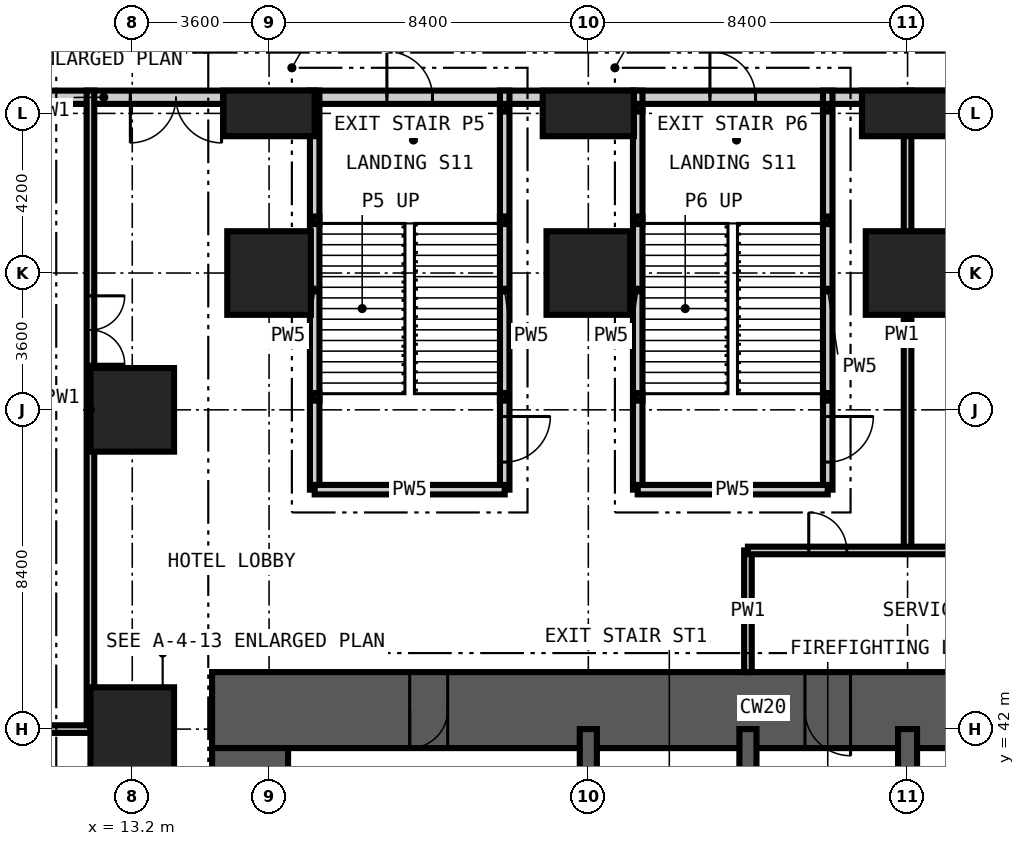
"""IFC4 building model, lengths in metres.
Left out: names, types, materials, properties, quantities, classifications, styles, units other than length and angle.
Written with IfcOpenShell. Run it as: python <this file> out.ifc"""

import sys

from ifc_helpers import new_model, si_unit, direction, frame, frame_2d, origin, origin_2d, place, context, subcontext, project, spatial, rectangle, hollow_rectangle, extrude, element, fill, save


model = new_model("IFC4")
c1 = context("Model", 3, precision=1e-05, world=origin(), true_north=direction((0.0, 1.0)))
c2 = subcontext(c1, "Body", "Model", "MODEL_VIEW")
j1 = project(units=[si_unit("LENGTHUNIT", "METRE"), si_unit("PLANEANGLEUNIT", "RADIAN")], contexts=[c1])
p1 = place(None, origin())
s1 = spatial("IfcSite", under=j1, at=p1, CompositionType="ELEMENT")
p2 = place(p1, origin())
s2 = spatial("IfcBuilding", under=s1, at=p2, CompositionType="ELEMENT")
p3 = place(p2, origin())
s3 = spatial("IfcBuildingStorey", under=s2, at=p3, CompositionType="ELEMENT", Elevation=0.0)
for number, where, z_axis, x_axis in (
    (1, (13.2, 42.0, -0.3), (0.0, 0.0, 1.0), (1.0, 0.0, 0.0)),
    (2, (13.2, 50.4, -0.3), (0.0, 0.0, 1.0), (1.0, 0.0, 0.0)),
    (3, (16.8, 54.0, -0.3), (0.0, 0.0, 1.0), (1.0, 0.0, 0.0)),
):
    element("IfcColumn", number, at=place(p3, frame(where, z_axis=z_axis, x_axis=x_axis)), inside=s3, PredefinedType="COLUMN", context=c2, shape_type="SweptSolid", body=[
        extrude(rectangle(XDim=2.2, YDim=2.2, at=origin_2d()), origin(), (0.0, 0.0, 1.0), 6.0),
    ])
p4 = place(p3, frame((16.8, 58.2, -0.3), z_axis=(0.0, 0.0, 1.0), x_axis=(1.0, 0.0, 0.0)))
e4 = element("IfcColumn", 4, at=p4, inside=s3, PredefinedType="COLUMN", context=c2, shape_type="SweptSolid", body=[
    extrude(rectangle(XDim=2.4, YDim=1.2, at=origin_2d()), origin(), (0.0, 0.0, 1.0), 6.0),
])
p5 = place(p3, frame((25.2, 54.0, -0.3), z_axis=(0.0, 0.0, 1.0), x_axis=(1.0, 0.0, 0.0)))
e5 = element("IfcColumn", 5, at=p5, inside=s3, PredefinedType="COLUMN", context=c2, shape_type="SweptSolid", body=[
    extrude(rectangle(XDim=2.2, YDim=2.2, at=origin_2d()), origin(), (0.0, 0.0, 1.0), 6.0),
])
p6 = place(p3, frame((25.2, 58.2, -0.3), z_axis=(0.0, 0.0, 1.0), x_axis=(1.0, 0.0, 0.0)))
e6 = element("IfcColumn", 6, at=p6, inside=s3, PredefinedType="COLUMN", context=c2, shape_type="SweptSolid", body=[
    extrude(rectangle(XDim=2.4, YDim=1.2, at=origin_2d()), origin(), (0.0, 0.0, 1.0), 6.0),
])
p7 = place(p3, frame((33.6, 54.0, -0.3), z_axis=(0.0, 0.0, 1.0), x_axis=(1.0, 0.0, 0.0)))
e7 = element("IfcColumn", 7, at=p7, inside=s3, PredefinedType="COLUMN", context=c2, shape_type="SweptSolid", body=[
    extrude(rectangle(XDim=2.2, YDim=2.2, at=origin_2d()), origin(), (0.0, 0.0, 1.0), 6.0),
])
p8 = place(p3, frame((33.6, 58.2, -0.3), z_axis=(0.0, 0.0, 1.0), x_axis=(1.0, 0.0, 0.0)))
e8 = element("IfcColumn", 8, at=p8, inside=s3, PredefinedType="COLUMN", context=c2, shape_type="SweptSolid", body=[
    extrude(rectangle(XDim=2.4, YDim=1.2, at=origin_2d()), origin(), (0.0, 0.0, 1.0), 6.0),
])
p9 = place(p3, frame((43.5, 42.5, -0.3), z_axis=(0.0, 0.0, 1.0), x_axis=(-1.0, 0.0, 0.0)))
e9 = element("IfcWall", 9, at=p9, inside=s3, PredefinedType="SHEAR", context=c2, shape_type="SweptSolid", body=[
    extrude(rectangle(XDim=28.2, YDim=2.0, at=frame_2d((14.1, 0.0))), origin(), (0.0, 0.0, 1.0), 6.0),
])
p10 = place(p9, frame((22.0, 0.0, 0.3)))
e10 = element("IfcOpeningElement", 10, at=p10, cuts=e9, PredefinedType="OPENING", context=c2, shape_type="SweptSolid", body=[
    extrude(rectangle(XDim=1.0, YDim=2.1, at=frame_2d((0.5, 1.05))), frame((0.0, 1.01, 0.0), z_axis=(0.0, -1.0, 0.0), x_axis=(1.0, 0.0, 0.0)), (0.0, 0.0, 1.0), 2.02),
])
p11 = place(p9, frame((11.4, 0.0, 0.3)))
e11 = element("IfcOpeningElement", 11, at=p11, cuts=e9, PredefinedType="OPENING", context=c2, shape_type="SweptSolid", body=[
    extrude(rectangle(XDim=1.2, YDim=2.2, at=frame_2d((0.6, 1.1))), frame((0.0, 1.01, 0.0), z_axis=(0.0, -1.0, 0.0), x_axis=(1.0, 0.0, 0.0)), (0.0, 0.0, 1.0), 2.02),
])
p12 = place(p3, frame((16.3, 41.5, -0.3), z_axis=(0.0, 0.0, 1.0), x_axis=(0.0, -1.0, 0.0)))
e12 = element("IfcWall", 12, at=p12, inside=s3, PredefinedType="SHEAR", context=c2, shape_type="SweptSolid", body=[
    extrude(rectangle(XDim=24.2, YDim=2.0, at=frame_2d((12.1, 0.0))), origin(), (0.0, 0.0, 1.0), 6.0),
])
p13 = place(p12, frame((11.2, 0.0, 0.3)))
e13 = element("IfcOpeningElement", 13, at=p13, cuts=e12, PredefinedType="OPENING", context=c2, shape_type="SweptSolid", body=[
    extrude(rectangle(XDim=1.8, YDim=2.2, at=frame_2d((0.9, 1.1))), frame((0.0, 1.01, 0.0), z_axis=(0.0, -1.0, 0.0), x_axis=(1.0, 0.0, 0.0)), (0.0, 0.0, 1.0), 2.02),
])
p14 = place(p12, frame((19.6, 0.0, 0.3)))
e14 = element("IfcOpeningElement", 14, at=p14, cuts=e12, PredefinedType="OPENING", context=c2, shape_type="SweptSolid", body=[
    extrude(rectangle(XDim=1.8, YDim=2.2, at=frame_2d((0.9, 1.1))), frame((0.0, 1.01, 0.0), z_axis=(0.0, -1.0, 0.0), x_axis=(1.0, 0.0, 0.0)), (0.0, 0.0, 1.0), 2.02),
])
p15 = place(p12, frame((5.3, 0.0, 0.3)))
e15 = element("IfcOpeningElement", 15, at=p15, cuts=e12, PredefinedType="OPENING", context=c2, shape_type="SweptSolid", body=[
    extrude(rectangle(XDim=1.0, YDim=2.1, at=frame_2d((0.5, 1.05))), frame((0.0, 1.01, 0.0), z_axis=(0.0, -1.0, 0.0), x_axis=(1.0, 0.0, 0.0)), (0.0, 0.0, 1.0), 2.02),
])
p16 = place(p3, frame((58.8, 58.625, 0.0), z_axis=(0.0, 0.0, 1.0), x_axis=(-1.0, 0.0, 0.0)))
e16 = element("IfcWall", 16, at=p16, inside=s3, PredefinedType="SOLIDWALL", context=c2, shape_type="SweptSolid", body=[
    extrude(rectangle(XDim=92.4, YDim=0.35, at=frame_2d((46.2, 0.0))), origin(), (0.0, 0.0, 1.0), 5.7),
])
p17 = place(p16, frame((85.2, 0.0, 0.0)))
e17 = element("IfcOpeningElement", 17, at=p17, cuts=e16, PredefinedType="OPENING", context=c2, shape_type="SweptSolid", body=[
    extrude(rectangle(XDim=1.8, YDim=2.7, at=frame_2d((0.9, 1.35))), frame((0.0, 0.185, 0.0), z_axis=(0.0, -1.0, 0.0), x_axis=(1.0, 0.0, 0.0)), (0.0, 0.0, 1.0), 0.37),
])
p18 = place(p16, frame((87.2, 0.0, 0.9)))
e18 = element("IfcOpeningElement", 18, at=p18, cuts=e16, PredefinedType="OPENING", context=c2, shape_type="SweptSolid", body=[
    extrude(rectangle(XDim=2.4, YDim=2.4, at=frame_2d((1.2, 1.2))), frame((0.0, 0.185, 0.0), z_axis=(0.0, -1.0, 0.0), x_axis=(1.0, 0.0, 0.0)), (0.0, 0.0, 1.0), 0.37),
])
p19 = place(p16, frame((80.7, 0.0, 0.9)))
e19 = element("IfcOpeningElement", 19, at=p19, cuts=e16, PredefinedType="OPENING", context=c2, shape_type="SweptSolid", body=[
    extrude(rectangle(XDim=2.4, YDim=2.4, at=frame_2d((1.2, 1.2))), frame((0.0, 0.185, 0.0), z_axis=(0.0, -1.0, 0.0), x_axis=(1.0, 0.0, 0.0)), (0.0, 0.0, 1.0), 0.37),
])
p20 = place(p16, frame((76.2, 0.0, 0.9)))
e20 = element("IfcOpeningElement", 20, at=p20, cuts=e16, PredefinedType="OPENING", context=c2, shape_type="SweptSolid", body=[
    extrude(rectangle(XDim=2.4, YDim=2.4, at=frame_2d((1.2, 1.2))), frame((0.0, 0.185, 0.0), z_axis=(0.0, -1.0, 0.0), x_axis=(1.0, 0.0, 0.0)), (0.0, 0.0, 1.0), 0.37),
])
p21 = place(p16, frame((71.9, 0.0, 0.0)))
e21 = element("IfcOpeningElement", 21, at=p21, cuts=e16, PredefinedType="OPENING", context=c2, shape_type="SweptSolid", body=[
    extrude(rectangle(XDim=1.2, YDim=2.4, at=frame_2d((0.6, 1.2))), frame((0.0, 0.185, 0.0), z_axis=(0.0, -1.0, 0.0), x_axis=(1.0, 0.0, 0.0)), (0.0, 0.0, 1.0), 0.37),
])
p22 = place(p16, frame((63.5, 0.0, 0.0)))
e22 = element("IfcOpeningElement", 22, at=p22, cuts=e16, PredefinedType="OPENING", context=c2, shape_type="SweptSolid", body=[
    extrude(rectangle(XDim=1.2, YDim=2.4, at=frame_2d((0.6, 1.2))), frame((0.0, 0.185, 0.0), z_axis=(0.0, -1.0, 0.0), x_axis=(1.0, 0.0, 0.0)), (0.0, 0.0, 1.0), 0.37),
])
p23 = place(p16, frame((59.0, 0.0, 0.0)))
e23 = element("IfcOpeningElement", 23, at=p23, cuts=e16, PredefinedType="OPENING", context=c2, shape_type="SweptSolid", body=[
    extrude(rectangle(XDim=2.4, YDim=3.0, at=frame_2d((1.2, 1.5))), frame((0.0, 0.185, 0.0), z_axis=(0.0, -1.0, 0.0), x_axis=(1.0, 0.0, 0.0)), (0.0, 0.0, 1.0), 0.37),
])
p24 = place(p16, frame((53.4, 0.0, 0.9)))
e24 = element("IfcOpeningElement", 24, at=p24, cuts=e16, PredefinedType="OPENING", context=c2, shape_type="SweptSolid", body=[
    extrude(rectangle(XDim=2.4, YDim=2.4, at=frame_2d((1.2, 1.2))), frame((0.0, 0.185, 0.0), z_axis=(0.0, -1.0, 0.0), x_axis=(1.0, 0.0, 0.0)), (0.0, 0.0, 1.0), 0.37),
])
p25 = place(p16, frame((43.25, 0.0, 0.0)))
e25 = element("IfcOpeningElement", 25, at=p25, cuts=e16, PredefinedType="OPENING", context=c2, shape_type="SweptSolid", body=[
    extrude(rectangle(XDim=2.4, YDim=3.0, at=frame_2d((1.2, 1.5))), frame((0.0, 0.185, 0.0), z_axis=(0.0, -1.0, 0.0), x_axis=(1.0, 0.0, 0.0)), (0.0, 0.0, 1.0), 0.37),
])
p26 = place(p16, frame((37.7, 0.0, 0.0)))
e26 = element("IfcOpeningElement", 26, at=p26, cuts=e16, PredefinedType="OPENING", context=c2, shape_type="SweptSolid", body=[
    extrude(rectangle(XDim=1.2, YDim=2.4, at=frame_2d((0.6, 1.2))), frame((0.0, 0.185, 0.0), z_axis=(0.0, -1.0, 0.0), x_axis=(1.0, 0.0, 0.0)), (0.0, 0.0, 1.0), 0.37),
])
p27 = place(p16, frame((29.2, 0.0, 0.0)))
e27 = element("IfcOpeningElement", 27, at=p27, cuts=e16, PredefinedType="OPENING", context=c2, shape_type="SweptSolid", body=[
    extrude(rectangle(XDim=1.2, YDim=2.4, at=frame_2d((0.6, 1.2))), frame((0.0, 0.185, 0.0), z_axis=(0.0, -1.0, 0.0), x_axis=(1.0, 0.0, 0.0)), (0.0, 0.0, 1.0), 0.37),
])
p28 = place(p16, frame((3.5, 0.0, 0.0)))
e28 = element("IfcOpeningElement", 28, at=p28, cuts=e16, PredefinedType="OPENING", context=c2, shape_type="SweptSolid", body=[
    extrude(rectangle(XDim=3.6, YDim=4.5, at=frame_2d((1.8, 2.25))), frame((0.0, 0.185, 0.0), z_axis=(0.0, -1.0, 0.0), x_axis=(1.0, 0.0, 0.0)), (0.0, 0.0, 1.0), 0.37),
])
p29 = place(p16, frame((11.4, 0.0, 0.9)))
e29 = element("IfcOpeningElement", 29, at=p29, cuts=e16, PredefinedType="OPENING", context=c2, shape_type="SweptSolid", body=[
    extrude(rectangle(XDim=2.4, YDim=2.4, at=frame_2d((1.2, 1.2))), frame((0.0, 0.185, 0.0), z_axis=(0.0, -1.0, 0.0), x_axis=(1.0, 0.0, 0.0)), (0.0, 0.0, 1.0), 0.37),
])
p30 = place(p3, frame((25.2, 16.8, -0.3), z_axis=(0.0, 0.0, 1.0), x_axis=(0.0, 1.0, 0.0)))
e30 = element("IfcWall", 30, at=p30, inside=s3, PredefinedType="SHEAR", context=c2, shape_type="SweptSolid", body=[
    extrude(rectangle(XDim=25.2, YDim=0.45, at=frame_2d((12.6, 0.0))), origin(), (0.0, 0.0, 1.0), 6.0),
])
p31 = place(p3, frame((29.4, 33.6, -0.3), z_axis=(0.0, 0.0, 1.0), x_axis=(0.0, 1.0, 0.0)))
e31 = element("IfcWall", 31, at=p31, inside=s3, PredefinedType="SHEAR", context=c2, shape_type="SweptSolid", body=[
    extrude(rectangle(XDim=8.4, YDim=0.45, at=frame_2d((4.2, 0.0))), origin(), (0.0, 0.0, 1.0), 6.0),
])
p32 = place(p31, frame((0.525, 0.0, 0.3)))
e32 = element("IfcOpeningElement", 32, at=p32, cuts=e31, PredefinedType="OPENING", context=c2, shape_type="SweptSolid", body=[
    extrude(rectangle(XDim=1.2, YDim=2.2, at=frame_2d((0.6, 1.1))), frame((0.0, 0.235, 0.0), z_axis=(0.0, -1.0, 0.0), x_axis=(1.0, 0.0, 0.0)), (0.0, 0.0, 1.0), 0.47),
])
p33 = place(p3, frame((33.6, 16.8, -0.3), z_axis=(0.0, 0.0, 1.0), x_axis=(0.0, 1.0, 0.0)))
e33 = element("IfcWall", 33, at=p33, inside=s3, PredefinedType="SHEAR", context=c2, shape_type="SweptSolid", body=[
    extrude(rectangle(XDim=25.2, YDim=0.5, at=frame_2d((12.6, 0.0))), origin(), (0.0, 0.0, 1.0), 6.0),
])
p34 = place(p33, frame((22.5, 0.0, 0.3)))
e34 = element("IfcOpeningElement", 34, at=p34, cuts=e33, PredefinedType="OPENING", context=c2, shape_type="SweptSolid", body=[
    extrude(rectangle(XDim=1.2, YDim=2.2, at=frame_2d((0.6, 1.1))), frame((0.0, 0.26, 0.0), z_axis=(0.0, -1.0, 0.0), x_axis=(1.0, 0.0, 0.0)), (0.0, 0.0, 1.0), 0.52),
])
p35 = place(p33, frame((18.3, 0.0, 0.3)))
e35 = element("IfcOpeningElement", 35, at=p35, cuts=e33, PredefinedType="OPENING", context=c2, shape_type="SweptSolid", body=[
    extrude(rectangle(XDim=1.2, YDim=2.2, at=frame_2d((0.6, 1.1))), frame((0.0, 0.26, 0.0), z_axis=(0.0, -1.0, 0.0), x_axis=(1.0, 0.0, 0.0)), (0.0, 0.0, 1.0), 0.52),
])
p36 = place(p3, frame((29.4, 43.5, 0.0), z_axis=(0.0, 0.0, 1.0), x_axis=(0.0, 1.0, 0.0)))
e36 = element("IfcWall", 36, at=p36, inside=s3, PredefinedType="PARTITIONING", context=c2, shape_type="SweptSolid", body=[
    extrude(rectangle(XDim=3.2, YDim=0.2, at=frame_2d((1.6, 0.0))), origin(), (0.0, 0.0, 1.0), 5.7),
])
p37 = place(p3, frame((33.6, 46.7, 0.0), z_axis=(0.0, 0.0, 1.0), x_axis=(0.0, 1.0, 0.0)))
e37 = element("IfcWall", 37, at=p37, inside=s3, PredefinedType="PARTITIONING", context=c2, shape_type="SweptSolid", body=[
    extrude(rectangle(XDim=12.1, YDim=0.2, at=frame_2d((6.05, 0.0))), origin(), (0.0, 0.0, 1.0), 5.7),
])
p38 = place(p3, frame((29.4, 46.7, 0.0), z_axis=(0.0, 0.0, 1.0), x_axis=(1.0, 0.0, 0.0)))
e38 = element("IfcWall", 38, at=p38, inside=s3, PredefinedType="PARTITIONING", context=c2, shape_type="SweptSolid", body=[
    extrude(rectangle(XDim=12.6, YDim=0.2, at=frame_2d((6.3, 0.0))), origin(), (0.0, 0.0, 1.0), 5.7),
])
p39 = place(p38, frame((1.6, 0.0, 0.0)))
e39 = element("IfcOpeningElement", 39, at=p39, cuts=e38, PredefinedType="OPENING", context=c2, shape_type="SweptSolid", body=[
    extrude(rectangle(XDim=1.0, YDim=2.1, at=frame_2d((0.5, 1.05))), frame((0.0, 0.11, 0.0), z_axis=(0.0, -1.0, 0.0), x_axis=(1.0, 0.0, 0.0)), (0.0, 0.0, 1.0), 0.22),
])
p40 = place(p3, frame((12.1, 58.8, 0.0), z_axis=(0.0, 0.0, 1.0), x_axis=(0.0, -1.0, 0.0)))
e40 = element("IfcWall", 40, at=p40, inside=s3, PredefinedType="PARTITIONING", context=c2, shape_type="SweptSolid", body=[
    extrude(rectangle(XDim=16.8, YDim=0.2, at=frame_2d((8.4, 0.0))), origin(), (0.0, 0.0, 1.0), 5.7),
])
p41 = place(p40, frame((5.4, 0.0, 0.0)))
e41 = element("IfcOpeningElement", 41, at=p41, cuts=e40, PredefinedType="OPENING", context=c2, shape_type="SweptSolid", body=[
    extrude(rectangle(XDim=1.8, YDim=2.4, at=frame_2d((0.9, 1.2))), frame((0.0, 0.11, 0.0), z_axis=(0.0, -1.0, 0.0), x_axis=(1.0, 0.0, 0.0)), (0.0, 0.0, 1.0), 0.22),
])
p42 = place(p3, frame((12.1, 42.0, 0.0), z_axis=(0.0, 0.0, 1.0), x_axis=(-1.0, 0.0, 0.0)))
e42 = element("IfcWall", 42, at=p42, inside=s3, PredefinedType="PARTITIONING", context=c2, shape_type="SweptSolid", body=[
    extrude(rectangle(XDim=4.2, YDim=0.2, at=frame_2d((2.1, 0.0))), origin(), (0.0, 0.0, 1.0), 5.7),
])
p43 = place(p3, frame((18.0, 48.3, 0.0), z_axis=(0.0, 0.0, 1.0), x_axis=(0.0, 1.0, 0.0)))
e43 = element("IfcWall", 43, at=p43, inside=s3, PredefinedType="PARTITIONING", context=c2, shape_type="SweptSolid", body=[
    extrude(rectangle(XDim=10.5, YDim=0.25, at=frame_2d((5.25, 0.0))), origin(), (0.0, 0.0, 1.0), 5.7),
])
p44 = place(p3, frame((23.0, 48.3, 0.0), z_axis=(0.0, 0.0, 1.0), x_axis=(0.0, 1.0, 0.0)))
e44 = element("IfcWall", 44, at=p44, inside=s3, PredefinedType="PARTITIONING", context=c2, shape_type="SweptSolid", body=[
    extrude(rectangle(XDim=10.5, YDim=0.25, at=frame_2d((5.25, 0.0))), origin(), (0.0, 0.0, 1.0), 5.7),
])
p45 = place(p44, frame((0.725, 0.0, 0.0)))
e45 = element("IfcOpeningElement", 45, at=p45, cuts=e44, PredefinedType="OPENING", context=c2, shape_type="SweptSolid", body=[
    extrude(rectangle(XDim=1.2, YDim=2.2, at=frame_2d((0.6, 1.1))), frame((0.0, 0.135, 0.0), z_axis=(0.0, -1.0, 0.0), x_axis=(1.0, 0.0, 0.0)), (0.0, 0.0, 1.0), 0.27),
])
p46 = place(p3, frame((26.5, 48.3, 0.0), z_axis=(0.0, 0.0, 1.0), x_axis=(0.0, 1.0, 0.0)))
e46 = element("IfcWall", 46, at=p46, inside=s3, PredefinedType="PARTITIONING", context=c2, shape_type="SweptSolid", body=[
    extrude(rectangle(XDim=10.5, YDim=0.25, at=frame_2d((5.25, 0.0))), origin(), (0.0, 0.0, 1.0), 5.7),
])
p47 = place(p3, frame((31.5, 48.3, 0.0), z_axis=(0.0, 0.0, 1.0), x_axis=(0.0, 1.0, 0.0)))
e47 = element("IfcWall", 47, at=p47, inside=s3, PredefinedType="PARTITIONING", context=c2, shape_type="SweptSolid", body=[
    extrude(rectangle(XDim=10.5, YDim=0.25, at=frame_2d((5.25, 0.0))), origin(), (0.0, 0.0, 1.0), 5.7),
])
p48 = place(p47, frame((0.725, 0.0, 0.0)))
e48 = element("IfcOpeningElement", 48, at=p48, cuts=e47, PredefinedType="OPENING", context=c2, shape_type="SweptSolid", body=[
    extrude(rectangle(XDim=1.2, YDim=2.2, at=frame_2d((0.6, 1.1))), frame((0.0, 0.135, 0.0), z_axis=(0.0, -1.0, 0.0), x_axis=(1.0, 0.0, 0.0)), (0.0, 0.0, 1.0), 0.27),
])
for number, where, z_axis, x_axis in (
    (49, (18.0, 48.3, 0.0), (0.0, 0.0, 1.0), (1.0, 0.0, 0.0)),
    (50, (26.5, 48.3, 0.0), (0.0, 0.0, 1.0), (1.0, 0.0, 0.0)),
):
    element("IfcWall", number, at=place(p3, frame(where, z_axis=z_axis, x_axis=x_axis)), inside=s3, PredefinedType="PARTITIONING", context=c2, shape_type="SweptSolid", body=[
        extrude(rectangle(XDim=5.0, YDim=0.25, at=frame_2d((2.5, 0.0))), origin(), (0.0, 0.0, 1.0), 5.7),
    ])
for number, where, z_axis, x_axis in (
    (51, (18.025, 50.742, -0.3), (0.0, 0.0, 1.0), (1.0, 0.0, 0.0)),
    (52, (22.975, 50.742, -0.3), (0.0, 0.0, 1.0), (1.0, 0.0, 0.0)),
    (53, (18.025, 55.387, -0.3), (0.0, 0.0, 1.0), (1.0, 0.0, 0.0)),
    (54, (22.975, 55.387, -0.3), (0.0, 0.0, 1.0), (1.0, 0.0, 0.0)),
    (55, (22.975, 58.35, -0.3), (0.0, 0.0, 1.0), (1.0, 0.0, 0.0)),
    (56, (26.525, 50.742, -0.3), (0.0, 0.0, 1.0), (1.0, 0.0, 0.0)),
    (57, (31.475, 50.742, -0.3), (0.0, 0.0, 1.0), (1.0, 0.0, 0.0)),
    (58, (26.525, 55.387, -0.3), (0.0, 0.0, 1.0), (1.0, 0.0, 0.0)),
    (59, (31.475, 55.387, -0.3), (0.0, 0.0, 1.0), (1.0, 0.0, 0.0)),
    (60, (26.525, 58.35, -0.3), (0.0, 0.0, 1.0), (1.0, 0.0, 0.0)),
    (61, (31.475, 58.35, -0.3), (0.0, 0.0, 1.0), (1.0, 0.0, 0.0)),
):
    element("IfcColumn", number, at=place(p3, frame(where, z_axis=z_axis, x_axis=x_axis)), inside=s3, PredefinedType="COLUMN", context=c2, shape_type="SweptSolid", body=[
        extrude(hollow_rectangle(XDim=0.2, YDim=0.2, WallThickness=0.01, at=origin_2d()), origin(), (0.0, 0.0, 1.0), 6.0),
    ])
p49 = place(p25, origin())
e62 = element("IfcDoor", 62, at=p49, inside=s3, OperationType="DOUBLE_DOOR_DOUBLE_SWING", PredefinedType="DOOR", context=c2, shape_type="SweptSolid", body=[
    extrude(rectangle(XDim=2.4, YDim=3.0, at=frame_2d((1.2, 1.5))), frame((0.0, 0.025, 0.0), z_axis=(0.0, -1.0, 0.0), x_axis=(1.0, 0.0, 0.0)), (0.0, 0.0, 1.0), 0.05),
])
fill(e25, e62)
p50 = place(p26, frame((1.2, 0.0, 0.0), z_axis=(0.0, 0.0, 1.0), x_axis=(-1.0, 0.0, 0.0)))
e63 = element("IfcDoor", 63, at=p50, inside=s3, OperationType="SINGLE_SWING_LEFT", PredefinedType="DOOR", context=c2, shape_type="SweptSolid", body=[
    extrude(rectangle(XDim=1.2, YDim=2.4, at=frame_2d((0.6, 1.2))), frame((0.0, 0.025, 0.0), z_axis=(0.0, -1.0, 0.0), x_axis=(1.0, 0.0, 0.0)), (0.0, 0.0, 1.0), 0.05),
])
fill(e26, e63)
p51 = place(p27, frame((1.2, 0.0, 0.0), z_axis=(0.0, 0.0, 1.0), x_axis=(-1.0, 0.0, 0.0)))
e64 = element("IfcDoor", 64, at=p51, inside=s3, OperationType="SINGLE_SWING_LEFT", PredefinedType="DOOR", context=c2, shape_type="SweptSolid", body=[
    extrude(rectangle(XDim=1.2, YDim=2.4, at=frame_2d((0.6, 1.2))), frame((0.0, 0.025, 0.0), z_axis=(0.0, -1.0, 0.0), x_axis=(1.0, 0.0, 0.0)), (0.0, 0.0, 1.0), 0.05),
])
fill(e27, e64)
p52 = place(p45, frame((1.2, 0.0, 0.0), z_axis=(0.0, 0.0, 1.0), x_axis=(-1.0, 0.0, 0.0)))
e65 = element("IfcDoor", 65, at=p52, inside=s3, OperationType="SINGLE_SWING_LEFT", PredefinedType="DOOR", context=c2, shape_type="SweptSolid", body=[
    extrude(rectangle(XDim=1.2, YDim=2.2, at=frame_2d((0.6, 1.1))), frame((0.0, 0.025, 0.0), z_axis=(0.0, -1.0, 0.0), x_axis=(1.0, 0.0, 0.0)), (0.0, 0.0, 1.0), 0.05),
])
fill(e45, e65)
p53 = place(p48, frame((1.2, 0.0, 0.0), z_axis=(0.0, 0.0, 1.0), x_axis=(-1.0, 0.0, 0.0)))
e66 = element("IfcDoor", 66, at=p53, inside=s3, OperationType="SINGLE_SWING_LEFT", PredefinedType="DOOR", context=c2, shape_type="SweptSolid", body=[
    extrude(rectangle(XDim=1.2, YDim=2.2, at=frame_2d((0.6, 1.1))), frame((0.0, 0.025, 0.0), z_axis=(0.0, -1.0, 0.0), x_axis=(1.0, 0.0, 0.0)), (0.0, 0.0, 1.0), 0.05),
])
fill(e48, e66)
p54 = place(p10, origin())
e67 = element("IfcDoor", 67, at=p54, inside=s3, OperationType="SINGLE_SWING_RIGHT", PredefinedType="DOOR", context=c2, shape_type="SweptSolid", body=[
    extrude(rectangle(XDim=1.0, YDim=2.1, at=frame_2d((0.5, 1.05))), frame((0.0, 0.025, 0.0), z_axis=(0.0, -1.0, 0.0), x_axis=(1.0, 0.0, 0.0)), (0.0, 0.0, 1.0), 0.05),
])
fill(e10, e67)
p55 = place(p11, origin())
e68 = element("IfcDoor", 68, at=p55, inside=s3, OperationType="SINGLE_SWING_LEFT", PredefinedType="DOOR", context=c2, shape_type="SweptSolid", body=[
    extrude(rectangle(XDim=1.2, YDim=2.2, at=frame_2d((0.6, 1.1))), frame((0.0, 0.025, 0.0), z_axis=(0.0, -1.0, 0.0), x_axis=(1.0, 0.0, 0.0)), (0.0, 0.0, 1.0), 0.05),
])
fill(e11, e68)
p56 = place(p39, origin())
e69 = element("IfcDoor", 69, at=p56, inside=s3, OperationType="SINGLE_SWING_LEFT", PredefinedType="DOOR", context=c2, shape_type="SweptSolid", body=[
    extrude(rectangle(XDim=1.0, YDim=2.1, at=frame_2d((0.5, 1.05))), frame((0.0, 0.025, 0.0), z_axis=(0.0, -1.0, 0.0), x_axis=(1.0, 0.0, 0.0)), (0.0, 0.0, 1.0), 0.05),
])
fill(e39, e69)
p57 = place(p41, origin())
e70 = element("IfcDoor", 70, at=p57, inside=s3, OperationType="DOUBLE_DOOR_DOUBLE_SWING", PredefinedType="DOOR", context=c2, shape_type="SweptSolid", body=[
    extrude(rectangle(XDim=1.8, YDim=2.4, at=frame_2d((0.9, 1.2))), frame((0.0, 0.025, 0.0), z_axis=(0.0, -1.0, 0.0), x_axis=(1.0, 0.0, 0.0)), (0.0, 0.0, 1.0), 0.05),
])
fill(e41, e70)
save(model, sys.argv[1])
